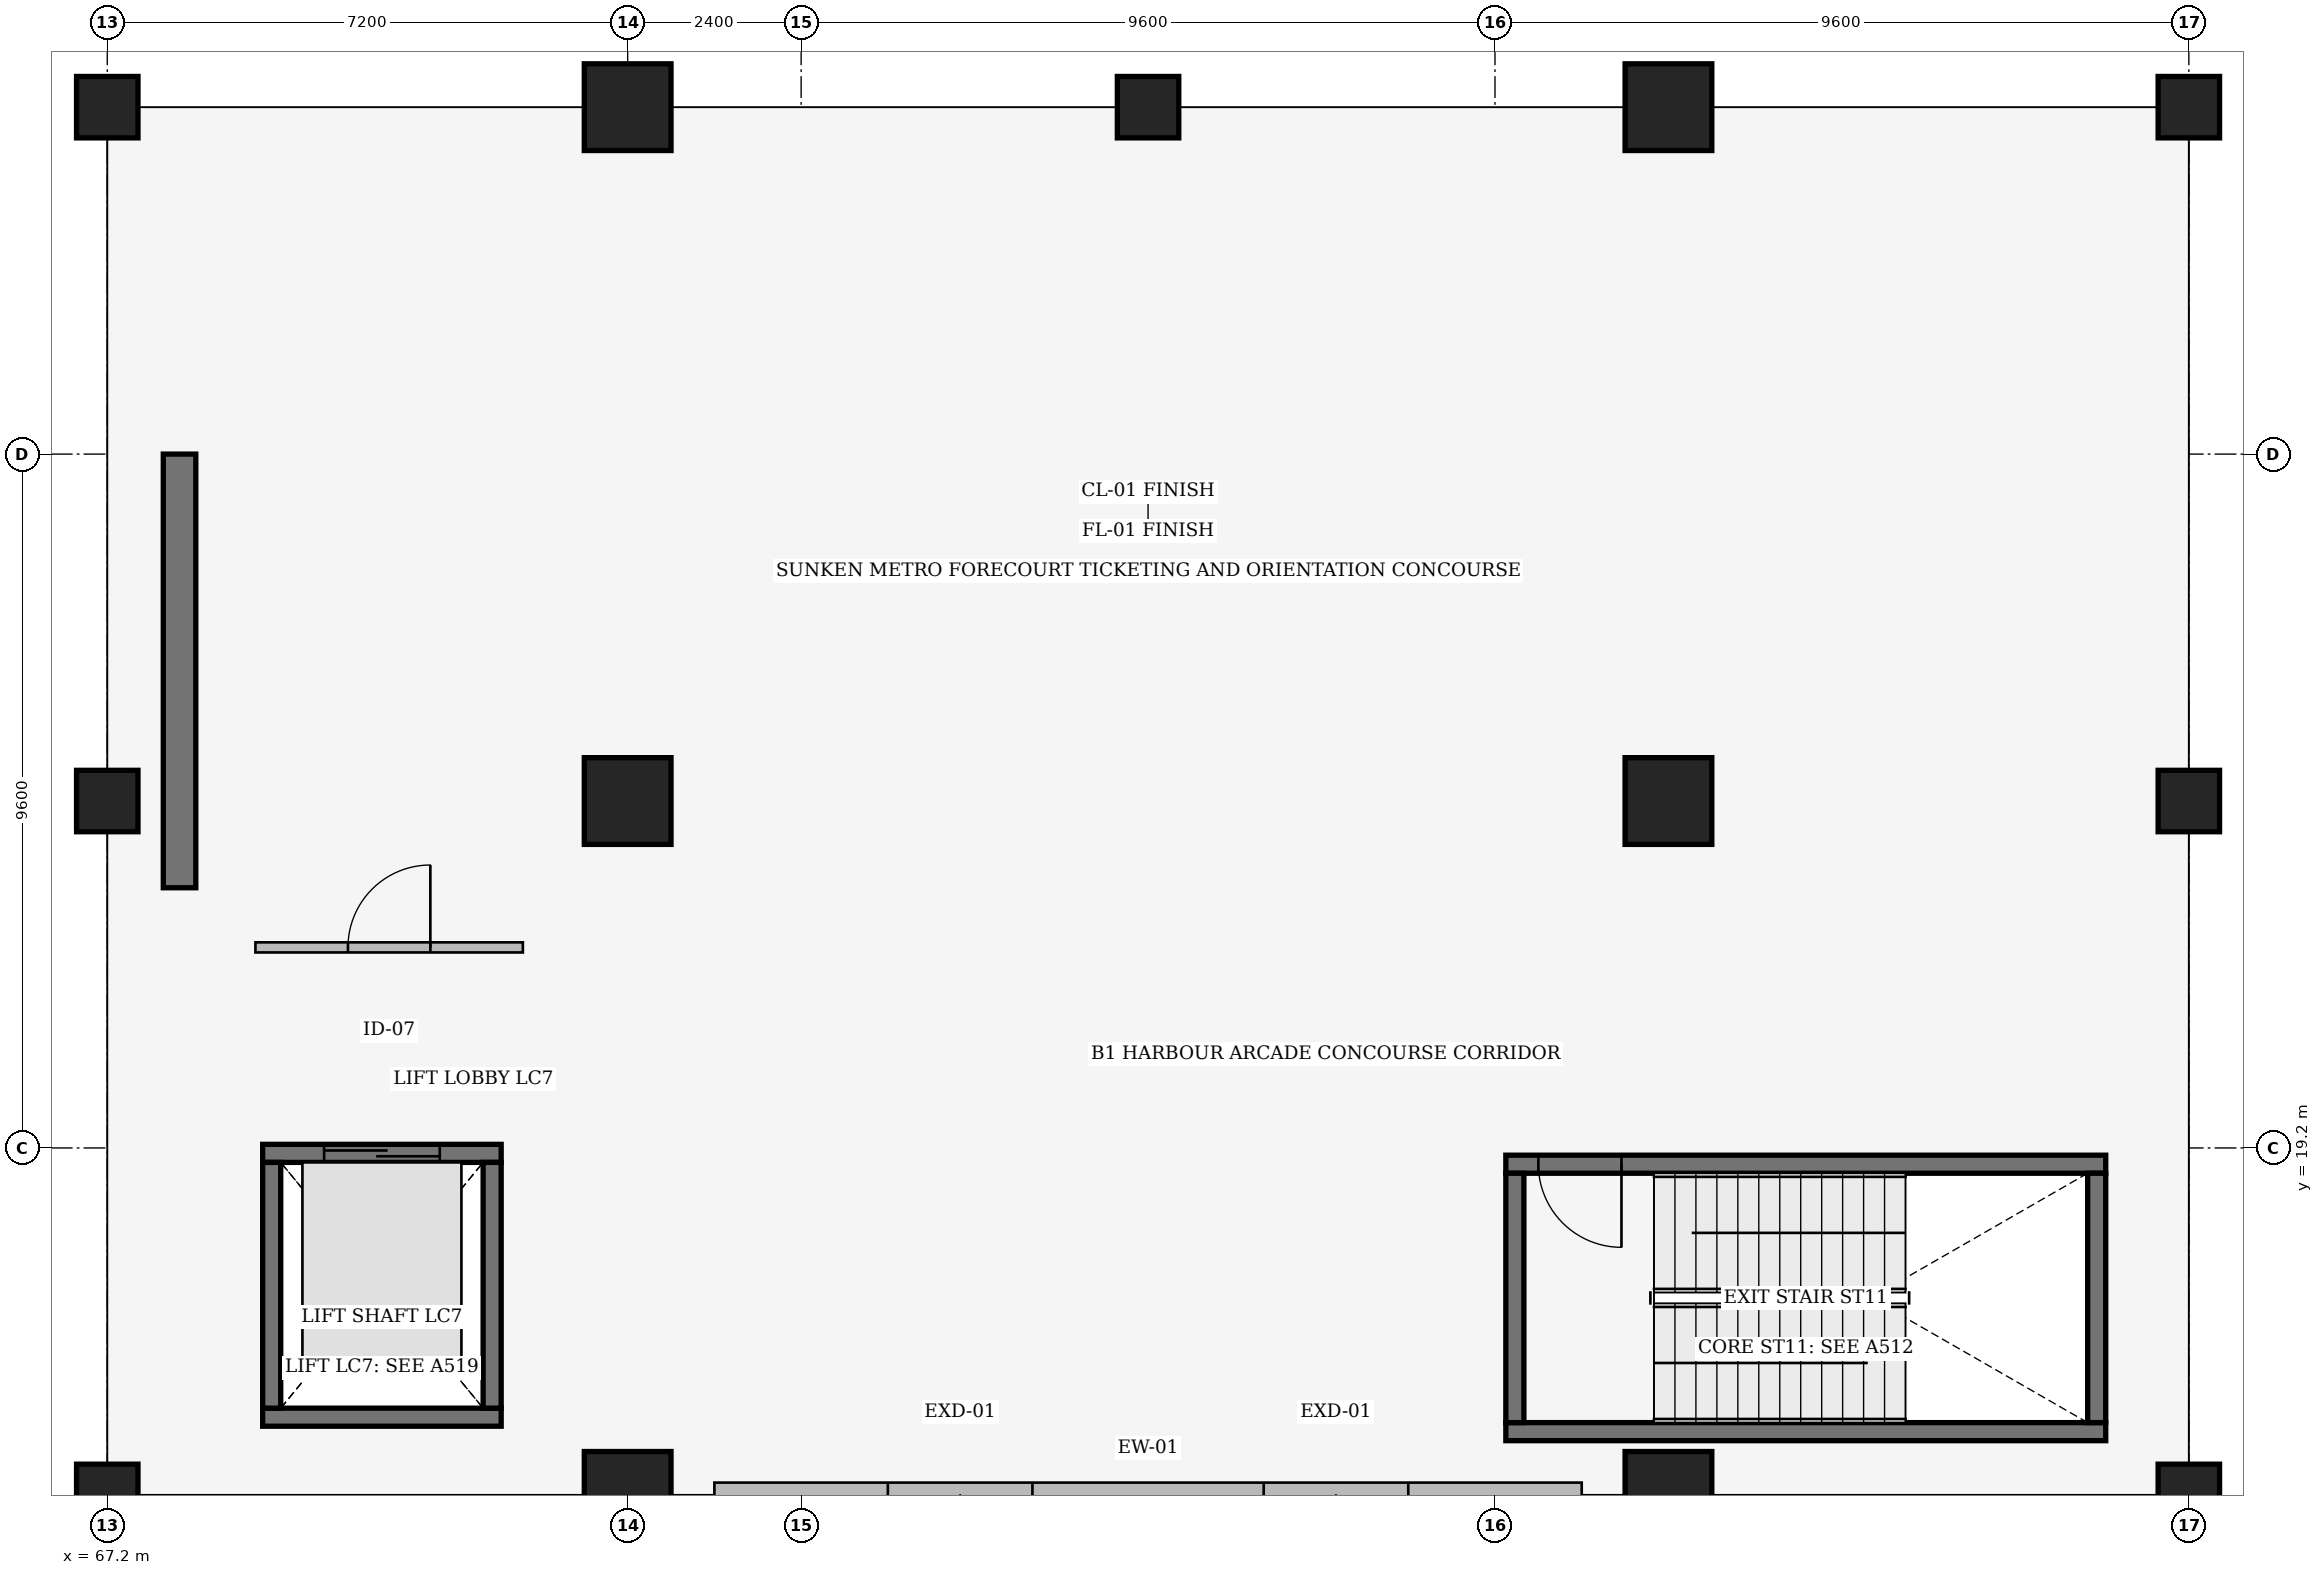
"""IFC4 building model, lengths in metres.
Left out: names, types, materials, properties, quantities, classifications, styles, units other than length and angle.
Written with IfcOpenShell. Run it as: python <this file> out.ifc"""

import sys

from ifc_helpers import new_model, si_unit, direction, frame, frame_2d, origin, origin_2d, place, context, subcontext, project, spatial, rectangle, extrude, element, fill, save


model = new_model("IFC4")
c1 = context("Model", 3, precision=1e-05, world=origin(), true_north=direction((0.0, 1.0)))
c2 = subcontext(c1, "Body", "Model", "MODEL_VIEW")
j1 = project(units=[si_unit("LENGTHUNIT", "METRE"), si_unit("PLANEANGLEUNIT", "RADIAN")], contexts=[c1])
p1 = place(None, origin())
s1 = spatial("IfcSite", under=j1, at=p1, CompositionType="ELEMENT")
p2 = place(p1, origin())
s2 = spatial("IfcBuilding", under=s1, at=p2, CompositionType="ELEMENT")
p3 = place(p2, frame((0.0, 0.0, -4.8)))
s3 = spatial("IfcBuildingStorey", under=s2, at=p3, CompositionType="ELEMENT", Elevation=-4.8)
for number, where, z_axis, x_axis in (
    (1, (67.2, 14.4, 0.0), (0.0, 0.0, 1.0), (1.0, 0.0, 0.0)),
    (2, (67.2, 24.0, 0.0), (0.0, 0.0, 1.0), (1.0, 0.0, 0.0)),
    (3, (67.2, 33.6, 0.0), (0.0, 0.0, 1.0), (1.0, 0.0, 0.0)),
):
    element("IfcColumn", number, at=place(p3, frame(where, z_axis=z_axis, x_axis=x_axis)), inside=s3, PredefinedType="COLUMN", context=c2, shape_type="SweptSolid", body=[
        extrude(rectangle(XDim=0.85, YDim=0.85, at=origin_2d()), origin(), (0.0, 0.0, 1.0), 4.8),
    ])
for number, where, z_axis, x_axis in (
    (4, (74.4, 14.4, 0.0), (0.0, 0.0, 1.0), (1.0, 0.0, 0.0)),
    (5, (74.4, 24.0, 0.0), (0.0, 0.0, 1.0), (1.0, 0.0, 0.0)),
    (6, (74.4, 33.6, 0.0), (0.0, 0.0, 1.0), (1.0, 0.0, 0.0)),
):
    element("IfcColumn", number, at=place(p3, frame(where, z_axis=z_axis, x_axis=x_axis)), inside=s3, PredefinedType="COLUMN", context=c2, shape_type="SweptSolid", body=[
        extrude(rectangle(XDim=1.2, YDim=1.2, at=origin_2d()), origin(), (0.0, 0.0, 1.0), 4.8),
    ])
p4 = place(p3, frame((81.6, 33.6, 0.0), z_axis=(0.0, 0.0, 1.0), x_axis=(1.0, 0.0, 0.0)))
e7 = element("IfcColumn", 7, at=p4, inside=s3, PredefinedType="COLUMN", context=c2, shape_type="SweptSolid", body=[
    extrude(rectangle(XDim=0.85, YDim=0.85, at=origin_2d()), origin(), (0.0, 0.0, 1.0), 4.8),
])
for number, where, z_axis, x_axis in (
    (8, (88.8, 14.4, 0.0), (0.0, 0.0, 1.0), (1.0, 0.0, 0.0)),
    (9, (88.8, 24.0, 0.0), (0.0, 0.0, 1.0), (1.0, 0.0, 0.0)),
    (10, (88.8, 33.6, 0.0), (0.0, 0.0, 1.0), (1.0, 0.0, 0.0)),
):
    element("IfcColumn", number, at=place(p3, frame(where, z_axis=z_axis, x_axis=x_axis)), inside=s3, PredefinedType="COLUMN", context=c2, shape_type="SweptSolid", body=[
        extrude(rectangle(XDim=1.2, YDim=1.2, at=origin_2d()), origin(), (0.0, 0.0, 1.0), 4.8),
    ])
for number, where, z_axis, x_axis in (
    (11, (96.0, 14.4, 0.0), (0.0, 0.0, 1.0), (1.0, 0.0, 0.0)),
    (12, (96.0, 24.0, 0.0), (0.0, 0.0, 1.0), (1.0, 0.0, 0.0)),
    (13, (96.0, 33.6, 0.0), (0.0, 0.0, 1.0), (1.0, 0.0, 0.0)),
):
    element("IfcColumn", number, at=place(p3, frame(where, z_axis=z_axis, x_axis=x_axis)), inside=s3, PredefinedType="COLUMN", context=c2, shape_type="SweptSolid", body=[
        extrude(rectangle(XDim=0.85, YDim=0.85, at=origin_2d()), origin(), (0.0, 0.0, 1.0), 4.8),
    ])
p5 = place(p3, frame((68.2, 22.8, 0.0), z_axis=(0.0, 0.0, 1.0), x_axis=(0.0, 1.0, 0.0)))
e14 = element("IfcWall", 14, at=p5, inside=s3, PredefinedType="SHEAR", context=c2, shape_type="SweptSolid", body=[
    extrude(rectangle(XDim=6.0, YDim=0.45, at=frame_2d((3.0, 0.0))), origin(), (0.0, 0.0, 1.0), 4.8),
])
p6 = place(p3, frame((75.6, 14.4, 0.0), z_axis=(0.0, 0.0, 1.0), x_axis=(1.0, 0.0, 0.0)))
e15 = element("IfcWall", 15, at=p6, inside=s3, PredefinedType="SOLIDWALL", context=c2, shape_type="SweptSolid", body=[
    extrude(rectangle(XDim=12.0, YDim=0.34, at=frame_2d((6.0, 0.0))), origin(), (0.0, 0.0, 1.0), 2.77),
])
p7 = place(p6, frame((4.4, 0.0, 0.0), z_axis=(0.0, 0.0, 1.0), x_axis=(-1.0, 0.0, 0.0)))
e16 = element("IfcOpeningElement", 16, at=p7, cuts=e15, PredefinedType="OPENING", context=c2, shape_type="SweptSolid", body=[
    extrude(rectangle(XDim=2.0, YDim=2.5, at=frame_2d((1.0, 1.25))), frame((0.0, 0.18, 0.0), z_axis=(0.0, -1.0, 0.0), x_axis=(1.0, 0.0, 0.0)), (0.0, 0.0, 1.0), 0.36),
])
p8 = place(p6, frame((9.6, 0.0, 0.0), z_axis=(0.0, 0.0, 1.0), x_axis=(-1.0, 0.0, 0.0)))
e17 = element("IfcOpeningElement", 17, at=p8, cuts=e15, PredefinedType="OPENING", context=c2, shape_type="SweptSolid", body=[
    extrude(rectangle(XDim=2.0, YDim=2.5, at=frame_2d((1.0, 1.25))), frame((0.0, 0.18, 0.0), z_axis=(0.0, -1.0, 0.0), x_axis=(1.0, 0.0, 0.0)), (0.0, 0.0, 1.0), 0.36),
])
p9 = place(p3, frame((86.55, 15.275, 0.0), z_axis=(0.0, 0.0, 1.0), x_axis=(1.0, 0.0, 0.0)))
e18 = element("IfcWall", 18, at=p9, inside=s3, PredefinedType="SHEAR", context=c2, shape_type="SweptSolid", body=[
    extrude(rectangle(XDim=8.3, YDim=0.25, at=frame_2d((4.15, 0.0))), origin(), (0.0, 0.0, 1.0), 4.5),
])
p10 = place(p3, frame((94.85, 18.975, 0.0), z_axis=(0.0, 0.0, 1.0), x_axis=(-1.0, 0.0, 0.0)))
e19 = element("IfcWall", 19, at=p10, inside=s3, PredefinedType="SHEAR", context=c2, shape_type="SweptSolid", body=[
    extrude(rectangle(XDim=8.3, YDim=0.25, at=frame_2d((4.15, 0.0))), origin(), (0.0, 0.0, 1.0), 4.5),
])
p11 = place(p10, frame((7.85, 0.0, 0.0), z_axis=(0.0, 0.0, 1.0), x_axis=(-1.0, 0.0, 0.0)))
e20 = element("IfcOpeningElement", 20, at=p11, cuts=e19, PredefinedType="OPENING", context=c2, shape_type="SweptSolid", body=[
    extrude(rectangle(XDim=1.15, YDim=2.2, at=frame_2d((0.575, 1.1))), frame((0.0, 0.135, 0.0), z_axis=(0.0, -1.0, 0.0), x_axis=(1.0, 0.0, 0.0)), (0.0, 0.0, 1.0), 0.27),
])
for number, where, z_axis, x_axis in (
    (21, (86.675, 18.85, 0.0), (0.0, 0.0, 1.0), (0.0, -1.0, 0.0)),
    (22, (94.725, 15.4, 0.0), (0.0, 0.0, 1.0), (0.0, 1.0, 0.0)),
):
    element("IfcWall", number, at=place(p3, frame(where, z_axis=z_axis, x_axis=x_axis)), inside=s3, PredefinedType="SHEAR", context=c2, shape_type="SweptSolid", body=[
        extrude(rectangle(XDim=3.45, YDim=0.25, at=frame_2d((1.725, 0.0))), origin(), (0.0, 0.0, 1.0), 4.5),
    ])
p12 = place(p3, frame((69.35, 15.475, 0.0), z_axis=(0.0, 0.0, 1.0), x_axis=(1.0, 0.0, 0.0)))
e23 = element("IfcWall", 23, at=p12, inside=s3, PredefinedType="SHEAR", context=c2, shape_type="SweptSolid", body=[
    extrude(rectangle(XDim=3.3, YDim=0.25, at=frame_2d((1.65, 0.0))), origin(), (0.0, 0.0, 1.0), 4.5),
])
p13 = place(p3, frame((69.35, 19.125, 0.0), z_axis=(0.0, 0.0, 1.0), x_axis=(1.0, 0.0, 0.0)))
e24 = element("IfcWall", 24, at=p13, inside=s3, PredefinedType="SHEAR", context=c2, shape_type="SweptSolid", body=[
    extrude(rectangle(XDim=3.3, YDim=0.25, at=frame_2d((1.65, 0.0))), origin(), (0.0, 0.0, 1.0), 4.5),
])
p14 = place(p13, frame((0.85, 0.0, 0.0)))
e25 = element("IfcOpeningElement", 25, at=p14, cuts=e24, PredefinedType="OPENING", context=c2, shape_type="SweptSolid", body=[
    extrude(rectangle(XDim=1.6, YDim=2.3, at=frame_2d((0.8, 1.15))), frame((0.0, 0.135, 0.0), z_axis=(0.0, -1.0, 0.0), x_axis=(1.0, 0.0, 0.0)), (0.0, 0.0, 1.0), 0.27),
])
for number, where, z_axis, x_axis in (
    (26, (69.475, 15.6, 0.0), (0.0, 0.0, 1.0), (0.0, 1.0, 0.0)),
    (27, (72.525, 15.6, 0.0), (0.0, 0.0, 1.0), (0.0, 1.0, 0.0)),
):
    element("IfcWall", number, at=place(p3, frame(where, z_axis=z_axis, x_axis=x_axis)), inside=s3, PredefinedType="SHEAR", context=c2, shape_type="SweptSolid", body=[
        extrude(rectangle(XDim=3.4, YDim=0.25, at=frame_2d((1.7, 0.0))), origin(), (0.0, 0.0, 1.0), 4.5),
    ])
p15 = place(p3, frame((69.25, 21.975, 0.0), z_axis=(0.0, 0.0, 1.0), x_axis=(1.0, 0.0, 0.0)))
e28 = element("IfcWall", 28, at=p15, inside=s3, PredefinedType="PARTITIONING", context=c2, shape_type="SweptSolid", body=[
    extrude(rectangle(XDim=3.7, YDim=0.14, at=frame_2d((1.85, 0.0))), origin(), (0.0, 0.0, 1.0), 4.113),
])
p16 = place(p15, frame((1.28, 0.0, 0.0)))
e29 = element("IfcOpeningElement", 29, at=p16, cuts=e28, PredefinedType="OPENING", context=c2, shape_type="SweptSolid", body=[
    extrude(rectangle(XDim=1.14, YDim=2.22, at=frame_2d((0.57, 1.11))), frame((0.0, 0.08, 0.0), z_axis=(0.0, -1.0, 0.0), x_axis=(1.0, 0.0, 0.0)), (0.0, 0.0, 1.0), 0.16),
])
p17 = place(p7, origin())
e30 = element("IfcDoor", 30, at=p17, inside=s3, OperationType="DOUBLE_DOOR_SINGLE_SWING", PredefinedType="DOOR", context=c2, shape_type="SweptSolid", body=[
    extrude(rectangle(XDim=2.0, YDim=2.5, at=frame_2d((1.0, 1.25))), frame((0.0, 0.025, 0.0), z_axis=(0.0, -1.0, 0.0), x_axis=(1.0, 0.0, 0.0)), (0.0, 0.0, 1.0), 0.05),
])
fill(e16, e30)
p18 = place(p8, origin())
e31 = element("IfcDoor", 31, at=p18, inside=s3, OperationType="DOUBLE_DOOR_SINGLE_SWING", PredefinedType="DOOR", context=c2, shape_type="SweptSolid", body=[
    extrude(rectangle(XDim=2.0, YDim=2.5, at=frame_2d((1.0, 1.25))), frame((0.0, 0.025, 0.0), z_axis=(0.0, -1.0, 0.0), x_axis=(1.0, 0.0, 0.0)), (0.0, 0.0, 1.0), 0.05),
])
fill(e17, e31)
p19 = place(p11, origin())
e32 = element("IfcDoor", 32, at=p19, inside=s3, OperationType="SINGLE_SWING_RIGHT", PredefinedType="DOOR", context=c2, shape_type="SweptSolid", body=[
    extrude(rectangle(XDim=1.15, YDim=2.2, at=frame_2d((0.575, 1.1))), frame((0.0, 0.025, 0.0), z_axis=(0.0, -1.0, 0.0), x_axis=(1.0, 0.0, 0.0)), (0.0, 0.0, 1.0), 0.05),
])
fill(e20, e32)
p20 = place(p14, origin())
e33 = element("IfcDoor", 33, at=p20, inside=s3, OperationType="DOUBLE_DOOR_SLIDING", PredefinedType="DOOR", context=c2, shape_type="SweptSolid", body=[
    extrude(rectangle(XDim=1.6, YDim=2.3, at=frame_2d((0.8, 1.15))), frame((0.0, 0.025, 0.0), z_axis=(0.0, -1.0, 0.0), x_axis=(1.0, 0.0, 0.0)), (0.0, 0.0, 1.0), 0.05),
])
fill(e25, e33)
p21 = place(p16, origin())
e34 = element("IfcDoor", 34, at=p21, inside=s3, OperationType="SINGLE_SWING_RIGHT", PredefinedType="DOOR", context=c2, shape_type="SweptSolid", body=[
    extrude(rectangle(XDim=1.14, YDim=2.22, at=frame_2d((0.57, 1.11))), frame((0.0, 0.025, 0.0), z_axis=(0.0, -1.0, 0.0), x_axis=(1.0, 0.0, 0.0)), (0.0, 0.0, 1.0), 0.05),
])
fill(e29, e34)
save(model, sys.argv[1])
